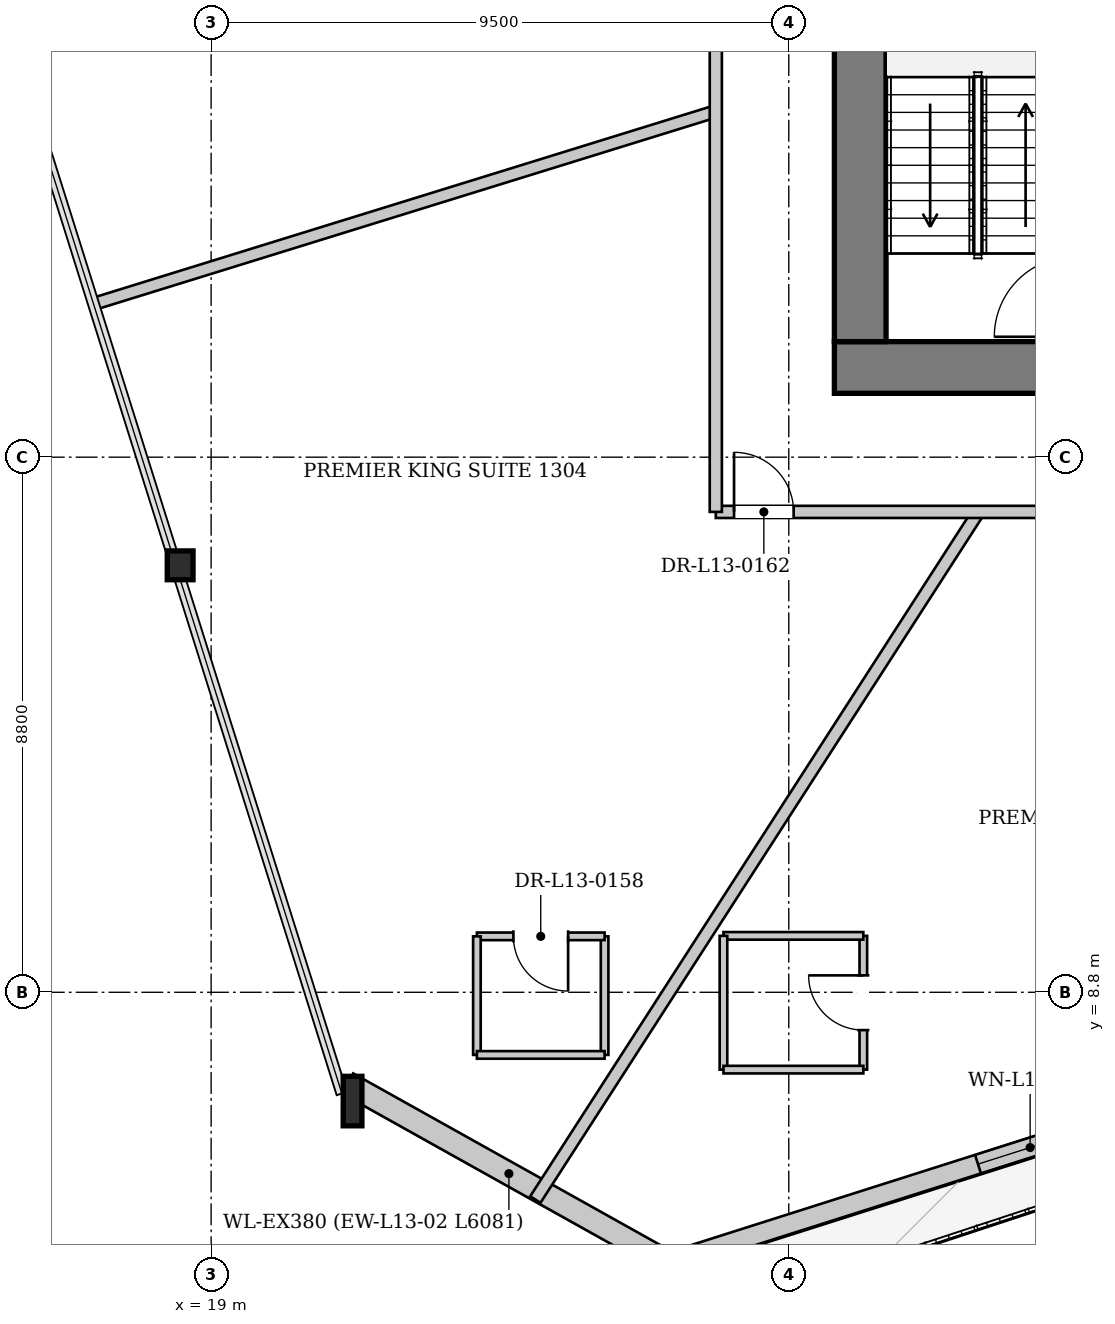
"""IFC4 building model, lengths in metres.
Left out: names, types, materials, properties, quantities, classifications, styles, units other than length and angle.
Written with IfcOpenShell. Run it as: python <this file> out.ifc"""

import sys

from ifc_helpers import new_model, si_unit, direction, frame, frame_2d, origin, origin_2d, place, context, subcontext, project, spatial, rectangle, i_section, extrude, source, transform, mapped, element, fill, save


model = new_model("IFC4")
c1 = context("Model", 3, precision=1e-05, world=origin(), true_north=direction((0.0, 1.0)))
c2 = subcontext(c1, "Body", "Model", "MODEL_VIEW")
j1 = project(units=[si_unit("LENGTHUNIT", "METRE"), si_unit("PLANEANGLEUNIT", "RADIAN")], contexts=[c1])
p1 = place(None, origin())
s1 = spatial("IfcSite", under=j1, at=p1, CompositionType="ELEMENT")
p2 = place(p1, origin())
s2 = spatial("IfcBuilding", under=s1, at=p2, CompositionType="ELEMENT")
p3 = place(p2, frame((0.0, 0.0, 54.15)))
s3 = spatial("IfcBuildingStorey", under=s2, at=p3, CompositionType="ELEMENT", Elevation=54.15)
m1 = source(origin(), c2, "Body", "SweptSolid", [
    extrude(i_section(OverallWidth=0.424, OverallDepth=0.474, WebThickness=0.043, FlangeThickness=0.068, at=origin_2d()), origin(), (0.0, 0.0, 1.0), 3.406),
])
p4 = place(p3, frame((18.371, 15.969, 0.0), z_axis=(0.069882980609, -0.086798245659, 0.993771821683), x_axis=(0.778919724294, 0.627123642598, 0.0)))
e1 = element("IfcColumn", 1, at=p4, inside=s3, PredefinedType="COLUMN", context=c2, shape_type="MappedRepresentation", body=[
    mapped(m1, transform((0.0, 0.0, 0.0), x_axis=(1.0, 0.0, 0.0), y_axis=(0.0, 1.0, 0.0), z_axis=(0.0, 0.0, 1.0), scale=1.0)),
])
m2 = source(origin(), c2, "Body", "SweptSolid", [
    extrude(i_section(OverallWidth=0.308, OverallDepth=0.814, WebThickness=0.021, FlangeThickness=0.04, at=origin_2d()), origin(), (0.0, 0.0, 1.0), 3.412),
])
p5 = place(p3, frame((21.15, 7.135, 0.0), z_axis=(0.102818377865, -0.0725524253, 0.992050667434), x_axis=(0.576549249714, 0.817062398263, 0.0)))
e2 = element("IfcColumn", 2, at=p5, inside=s3, PredefinedType="COLUMN", context=c2, shape_type="MappedRepresentation", body=[
    mapped(m2, transform((0.0, 0.0, 0.0), x_axis=(1.0, 0.0, 0.0), y_axis=(0.0, 1.0, 0.0), z_axis=(0.0, 0.0, 1.0), scale=1.0)),
])
p6 = place(p3, frame((49.715, 11.728, 0.0), z_axis=(0.0, 0.0, 1.0), x_axis=(-0.95301817626, -0.30291311579, 0.0)))
e3 = element("IfcWall", 3, at=p6, inside=s3, PredefinedType="SOLIDWALL", context=c2, shape_type="SweptSolid", body=[
    extrude(rectangle(XDim=24.453, YDim=0.32, at=frame_2d((12.227, 0.0))), origin(), (0.0, 0.0, 1.0), 2.592),
])
p7 = place(p6, frame((7.275, 0.0, 0.0)))
e4 = element("IfcOpeningElement", 4, at=p7, cuts=e3, PredefinedType="OPENING", context=c2, shape_type="SweptSolid", body=[
    extrude(rectangle(XDim=1.1, YDim=2.3, at=frame_2d((0.55, 1.15))), frame((0.0, 0.17, 0.0), z_axis=(0.0, -1.0, 0.0), x_axis=(1.0, 0.0, 0.0)), (0.0, 0.0, 1.0), 0.34),
])
p8 = place(p6, frame((17.195, 0.0, 0.272)))
e5 = element("IfcOpeningElement", 5, at=p8, cuts=e3, PredefinedType="OPENING", context=c2, shape_type="SweptSolid", body=[
    extrude(rectangle(XDim=1.8, YDim=2.2, at=frame_2d((0.9, 1.1))), frame((0.0, 0.17, 0.0), z_axis=(0.0, -1.0, 0.0), x_axis=(1.0, 0.0, 0.0)), (0.0, 0.0, 1.0), 0.34),
])
p9 = place(p3, frame((26.552, 4.334, 0.0), z_axis=(0.0, 0.0, 1.0), x_axis=(-0.872917836557, 0.487867246923, 0.0)))
e6 = element("IfcWall", 6, at=p9, inside=s3, PredefinedType="SOLIDWALL", context=c2, shape_type="SweptSolid", body=[
    extrude(rectangle(XDim=6.081, YDim=0.38, at=frame_2d((3.041, 0.0))), origin(), (0.0, 0.0, 1.0), 2.592),
])
p10 = place(p3, frame((46.75, 19.075, 0.0), z_axis=(0.0, 0.0, 1.0), x_axis=(-1.0, 0.0, 0.0)))
e7 = element("IfcWall", 7, at=p10, inside=s3, PredefinedType="SHEAR", context=c2, shape_type="SweptSolid", body=[
    extrude(rectangle(XDim=17.5, YDim=0.85, at=frame_2d((8.75, 0.0))), origin(), (0.0, 0.0, 1.0), 3.3),
])
p11 = place(p10, frame((4.95, 0.0, 0.0)))
e8 = element("IfcOpeningElement", 8, at=p11, cuts=e7, PredefinedType="OPENING", context=c2, shape_type="SweptSolid", body=[
    extrude(rectangle(XDim=1.12, YDim=2.25, at=frame_2d((0.56, 1.125))), frame((0.0, 0.435, 0.0), z_axis=(0.0, -1.0, 0.0), x_axis=(1.0, 0.0, 0.0)), (0.0, 0.0, 1.0), 0.87),
])
p12 = place(p10, frame((11.45, 0.0, 0.0)))
e9 = element("IfcOpeningElement", 9, at=p12, cuts=e7, PredefinedType="OPENING", context=c2, shape_type="SweptSolid", body=[
    extrude(rectangle(XDim=1.12, YDim=2.25, at=frame_2d((0.56, 1.125))), frame((0.0, 0.435, 0.0), z_axis=(0.0, -1.0, 0.0), x_axis=(1.0, 0.0, 0.0)), (0.0, 0.0, 1.0), 0.87),
])
p13 = place(p3, frame((29.675, 19.5, 0.0), z_axis=(0.0, 0.0, 1.0), x_axis=(0.0, 1.0, 0.0)))
e10 = element("IfcWall", 10, at=p13, inside=s3, PredefinedType="SHEAR", context=c2, shape_type="SweptSolid", body=[
    extrude(rectangle(XDim=14.2, YDim=0.85, at=frame_2d((7.1, 0.0))), origin(), (0.0, 0.0, 1.0), 3.3),
])
p14 = place(p13, frame((7.42, 0.0, 0.0)))
e11 = element("IfcOpeningElement", 11, at=p14, cuts=e10, PredefinedType="OPENING", context=c2, shape_type="SweptSolid", body=[
    extrude(rectangle(XDim=1.6, YDim=2.2, at=frame_2d((0.8, 1.1))), frame((0.0, 0.435, 0.0), z_axis=(0.0, -1.0, 0.0), x_axis=(1.0, 0.0, 0.0)), (0.0, 0.0, 1.0), 0.87),
])
p15 = place(p3, frame((27.3, 23.288, 0.0), z_axis=(0.0, 0.0, 1.0), x_axis=(-0.955277591085, -0.295710540851, 0.0)))
e12 = element("IfcWall", 12, at=p15, inside=s3, PredefinedType="PARTITIONING", context=c2, shape_type="SweptSolid", body=[
    extrude(rectangle(XDim=10.683, YDim=0.2, at=frame_2d((5.342, 0.0))), origin(), (0.0, 0.0, 1.0), 3.3),
])
p16 = place(p3, frame((31.62, 16.7, 0.0), z_axis=(0.0, 0.0, 1.0), x_axis=(-0.541710166358, -0.840565342888, 0.0)))
e13 = element("IfcWall", 13, at=p16, inside=s3, PredefinedType="PARTITIONING", context=c2, shape_type="SweptSolid", body=[
    extrude(rectangle(XDim=13.454, YDim=0.2, at=frame_2d((6.727, 0.0))), origin(), (0.0, 0.0, 1.0), 3.3),
])
p17 = place(p3, frame((25.471, 7.77, 0.0), z_axis=(0.0, 0.0, 1.0), x_axis=(0.0, 1.0, 0.0)))
e14 = element("IfcWall", 14, at=p17, inside=s3, PredefinedType="PARTITIONING", context=c2, shape_type="SweptSolid", body=[
    extrude(rectangle(XDim=1.95, YDim=0.125, at=frame_2d((0.975, 0.0))), origin(), (0.0, 0.0, 1.0), 3.3),
])
p18 = place(p3, frame((25.471, 9.72, 0.0), z_axis=(0.0, 0.0, 1.0), x_axis=(-1.0, 0.0, 0.0)))
e15 = element("IfcWall", 15, at=p18, inside=s3, PredefinedType="PARTITIONING", context=c2, shape_type="SweptSolid", body=[
    extrude(rectangle(XDim=2.1, YDim=0.125, at=frame_2d((1.05, 0.0))), origin(), (0.0, 0.0, 1.0), 3.3),
])
p19 = place(p18, frame((0.6, 0.0, 0.0)))
e16 = element("IfcOpeningElement", 16, at=p19, cuts=e15, PredefinedType="OPENING", context=c2, shape_type="SweptSolid", body=[
    extrude(rectangle(XDim=0.9, YDim=2.1, at=frame_2d((0.45, 1.05))), frame((0.0, 0.073, 0.0), z_axis=(0.0, -1.0, 0.0), x_axis=(1.0, 0.0, 0.0)), (0.0, 0.0, 1.0), 0.145),
])
p20 = place(p3, frame((23.371, 9.72, 0.0), z_axis=(0.0, 0.0, 1.0), x_axis=(0.0, -1.0, 0.0)))
e17 = element("IfcWall", 17, at=p20, inside=s3, PredefinedType="PARTITIONING", context=c2, shape_type="SweptSolid", body=[
    extrude(rectangle(XDim=1.95, YDim=0.125, at=frame_2d((0.975, 0.0))), origin(), (0.0, 0.0, 1.0), 3.3),
])
p21 = place(p3, frame((23.371, 7.77, 0.0), z_axis=(0.0, 0.0, 1.0), x_axis=(1.0, 0.0, 0.0)))
e18 = element("IfcWall", 18, at=p21, inside=s3, PredefinedType="PARTITIONING", context=c2, shape_type="SweptSolid", body=[
    extrude(rectangle(XDim=2.1, YDim=0.125, at=frame_2d((1.05, 0.0))), origin(), (0.0, 0.0, 1.0), 3.3),
])
p22 = place(p3, frame((29.726, 7.528, 0.0), z_axis=(0.0, 0.0, 1.0), x_axis=(0.0, 1.0, 0.0)))
e19 = element("IfcWall", 19, at=p22, inside=s3, PredefinedType="PARTITIONING", context=c2, shape_type="SweptSolid", body=[
    extrude(rectangle(XDim=2.2, YDim=0.125, at=frame_2d((1.1, 0.0))), origin(), (0.0, 0.0, 1.0), 2.795),
])
p23 = place(p22, frame((0.65, 0.0, 0.0)))
e20 = element("IfcOpeningElement", 20, at=p23, cuts=e19, PredefinedType="OPENING", context=c2, shape_type="SweptSolid", body=[
    extrude(rectangle(XDim=0.9, YDim=2.1, at=frame_2d((0.45, 1.05))), frame((0.0, 0.073, 0.0), z_axis=(0.0, -1.0, 0.0), x_axis=(1.0, 0.0, 0.0)), (0.0, 0.0, 1.0), 0.145),
])
p24 = place(p3, frame((29.726, 9.728, 0.0), z_axis=(0.0, 0.0, 1.0), x_axis=(-1.0, 0.0, 0.0)))
e21 = element("IfcWall", 21, at=p24, inside=s3, PredefinedType="PARTITIONING", context=c2, shape_type="SweptSolid", body=[
    extrude(rectangle(XDim=2.3, YDim=0.125, at=frame_2d((1.15, 0.0))), origin(), (0.0, 0.0, 1.0), 3.3),
])
p25 = place(p3, frame((27.426, 9.728, 0.0), z_axis=(0.0, 0.0, 1.0), x_axis=(0.0, -1.0, 0.0)))
e22 = element("IfcWall", 22, at=p25, inside=s3, PredefinedType="PARTITIONING", context=c2, shape_type="SweptSolid", body=[
    extrude(rectangle(XDim=2.2, YDim=0.125, at=frame_2d((1.1, 0.0))), origin(), (0.0, 0.0, 1.0), 3.3),
])
p26 = place(p3, frame((27.426, 7.528, 0.0), z_axis=(0.0, 0.0, 1.0), x_axis=(1.0, 0.0, 0.0)))
e23 = element("IfcWall", 23, at=p26, inside=s3, PredefinedType="PARTITIONING", context=c2, shape_type="SweptSolid", body=[
    extrude(rectangle(XDim=2.3, YDim=0.125, at=frame_2d((1.15, 0.0))), origin(), (0.0, 0.0, 1.0), 3.3),
])
p27 = place(p3, frame((27.3, 16.7, 0.0), z_axis=(0.0, 0.0, 1.0), x_axis=(1.0, 0.0, 0.0)))
e24 = element("IfcWall", 24, at=p27, inside=s3, PredefinedType="PARTITIONING", context=c2, shape_type="SweptSolid", body=[
    extrude(rectangle(XDim=21.4, YDim=0.2, at=frame_2d((10.7, 0.0))), origin(), (0.0, 0.0, 1.0), 3.3),
])
p28 = place(p27, frame((0.3, 0.0, 0.0)))
e25 = element("IfcOpeningElement", 25, at=p28, cuts=e24, PredefinedType="OPENING", context=c2, shape_type="SweptSolid", body=[
    extrude(rectangle(XDim=0.98, YDim=2.15, at=frame_2d((0.49, 1.075))), frame((0.0, 0.11, 0.0), z_axis=(0.0, -1.0, 0.0), x_axis=(1.0, 0.0, 0.0)), (0.0, 0.0, 1.0), 0.22),
])
p29 = place(p27, frame((6.74, 0.0, 0.0)))
e26 = element("IfcOpeningElement", 26, at=p29, cuts=e24, PredefinedType="OPENING", context=c2, shape_type="SweptSolid", body=[
    extrude(rectangle(XDim=0.98, YDim=2.15, at=frame_2d((0.49, 1.075))), frame((0.0, 0.11, 0.0), z_axis=(0.0, -1.0, 0.0), x_axis=(1.0, 0.0, 0.0)), (0.0, 0.0, 1.0), 0.22),
])
p30 = place(p27, frame((18.813, 0.0, 0.0)))
e27 = element("IfcOpeningElement", 27, at=p30, cuts=e24, PredefinedType="OPENING", context=c2, shape_type="SweptSolid", body=[
    extrude(rectangle(XDim=0.98, YDim=2.15, at=frame_2d((0.49, 1.075))), frame((0.0, 0.11, 0.0), z_axis=(0.0, -1.0, 0.0), x_axis=(1.0, 0.0, 0.0)), (0.0, 0.0, 1.0), 0.22),
])
p31 = place(p3, frame((27.3, 16.7, 0.0), z_axis=(0.0, 0.0, 1.0), x_axis=(0.0, 1.0, 0.0)))
e28 = element("IfcWall", 28, at=p31, inside=s3, PredefinedType="PARTITIONING", context=c2, shape_type="SweptSolid", body=[
    extrude(rectangle(XDim=19.8, YDim=0.2, at=frame_2d((9.9, 0.0))), origin(), (0.0, 0.0, 1.0), 3.3),
])
p32 = place(p31, frame((18.52, 0.0, 0.0)))
e29 = element("IfcOpeningElement", 29, at=p32, cuts=e28, PredefinedType="OPENING", context=c2, shape_type="SweptSolid", body=[
    extrude(rectangle(XDim=0.98, YDim=2.15, at=frame_2d((0.49, 1.075))), frame((0.0, 0.11, 0.0), z_axis=(0.0, -1.0, 0.0), x_axis=(1.0, 0.0, 0.0)), (0.0, 0.0, 1.0), 0.22),
])
p33 = place(p31, frame((10.654, 0.0, 0.0)))
e30 = element("IfcOpeningElement", 30, at=p33, cuts=e28, PredefinedType="OPENING", context=c2, shape_type="SweptSolid", body=[
    extrude(rectangle(XDim=0.98, YDim=2.15, at=frame_2d((0.49, 1.075))), frame((0.0, 0.11, 0.0), z_axis=(0.0, -1.0, 0.0), x_axis=(1.0, 0.0, 0.0)), (0.0, 0.0, 1.0), 0.22),
])
m3 = source(origin(), c2, "Body", "SweptSolid", [
    extrude(rectangle(XDim=1.8, YDim=2.2, at=frame_2d((0.9, 1.1))), frame((0.0, 0.03, 0.0), z_axis=(0.0, -1.0, 0.0), x_axis=(1.0, 0.0, 0.0)), (0.0, 0.0, 1.0), 0.06),
])
p34 = place(p8, origin())
e31 = element("IfcWindow", 31, at=p34, inside=s3, PartitioningType="SINGLE_PANEL", PredefinedType="WINDOW", context=c2, shape_type="MappedRepresentation", body=[
    mapped(m3, transform((0.0, 0.0, 0.0), x_axis=(1.0, 0.0, 0.0), y_axis=(0.0, 1.0, 0.0), z_axis=(0.0, 0.0, 1.0), scale=1.0)),
])
fill(e5, e31)
m4 = source(origin(), c2, "Body", "SweptSolid", [
    extrude(rectangle(XDim=0.9, YDim=2.1, at=frame_2d((0.45, 1.05))), frame((0.0, 0.025, 0.0), z_axis=(0.0, -1.0, 0.0), x_axis=(1.0, 0.0, 0.0)), (0.0, 0.0, 1.0), 0.05),
])
p35 = place(p19, origin())
e32 = element("IfcDoor", 32, at=p35, inside=s3, OperationType="SINGLE_SWING_LEFT", PredefinedType="DOOR", context=c2, shape_type="MappedRepresentation", body=[
    mapped(m4, transform((0.0, 0.0, 0.0), x_axis=(1.0, 0.0, 0.0), y_axis=(0.0, 1.0, 0.0), z_axis=(0.0, 0.0, 1.0), scale=1.0)),
])
fill(e16, e32)
p36 = place(p23, origin())
e33 = element("IfcDoor", 33, at=p36, inside=s3, OperationType="SINGLE_SWING_RIGHT", PredefinedType="DOOR", context=c2, shape_type="MappedRepresentation", body=[
    mapped(m4, transform((0.0, 0.0, 0.0), x_axis=(1.0, 0.0, 0.0), y_axis=(0.0, 1.0, 0.0), z_axis=(0.0, 0.0, 1.0), scale=1.0)),
])
fill(e20, e33)
m5 = source(origin(), c2, "Body", "SweptSolid", [
    extrude(rectangle(XDim=0.98, YDim=2.15, at=frame_2d((0.49, 1.075))), frame((0.0, 0.025, 0.0), z_axis=(0.0, -1.0, 0.0), x_axis=(1.0, 0.0, 0.0)), (0.0, 0.0, 1.0), 0.05),
])
p37 = place(p28, origin())
e34 = element("IfcDoor", 34, at=p37, inside=s3, OperationType="SINGLE_SWING_LEFT", PredefinedType="DOOR", context=c2, shape_type="MappedRepresentation", body=[
    mapped(m5, transform((0.0, 0.0, 0.0), x_axis=(1.0, 0.0, 0.0), y_axis=(0.0, 1.0, 0.0), z_axis=(0.0, 0.0, 1.0), scale=1.0)),
])
fill(e25, e34)
save(model, sys.argv[1])
